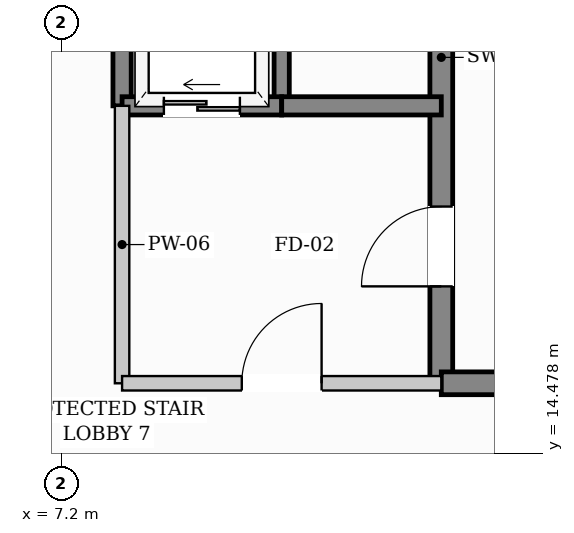
"""IFC4 building model, lengths in metres.
Left out: names, types, materials, properties, quantities, classifications, styles, units other than length and angle.
Written with IfcOpenShell. Run it as: python <this file> out.ifc"""

import sys

from ifc_helpers import new_model, si_unit, direction, frame, frame_2d, origin, place, context, subcontext, project, spatial, rectangle, extrude, element, fill, save


model = new_model("IFC4")
c1 = context("Model", 3, precision=1e-05, world=origin(), true_north=direction((0.0, 1.0)))
c2 = subcontext(c1, "Body", "Model", "MODEL_VIEW")
j1 = project(units=[si_unit("LENGTHUNIT", "METRE"), si_unit("PLANEANGLEUNIT", "RADIAN")], contexts=[c1])
p1 = place(None, origin())
s1 = spatial("IfcSite", under=j1, at=p1, CompositionType="ELEMENT")
p2 = place(p1, origin())
s2 = spatial("IfcBuilding", under=s1, at=p2, CompositionType="ELEMENT")
p3 = place(p2, frame((0.0, 0.0, 5.1)))
s3 = spatial("IfcBuildingStorey", under=s2, at=p3, CompositionType="ELEMENT", Elevation=5.1)
p4 = place(p3, frame((12.2, 15.4, 0.0), z_axis=(0.0, 0.0, 1.0), x_axis=(0.0, 1.0, 0.0)))
e1 = element("IfcWall", 1, at=p4, inside=s3, PredefinedType="SHEAR", context=c2, shape_type="SweptSolid", body=[
    extrude(rectangle(XDim=6.0, YDim=0.3, at=frame_2d((3.0, 0.0))), origin(), (0.0, 0.0, 1.0), 4.22),
])
p5 = place(p4, frame((1.275, 0.0, 0.0)))
e2 = element("IfcOpeningElement", 2, at=p5, cuts=e1, PredefinedType="OPENING", context=c2, shape_type="SweptSolid", body=[
    extrude(rectangle(XDim=1.05, YDim=2.15, at=frame_2d((0.525, 1.075))), frame((0.0, 0.16, 0.0), z_axis=(0.0, -1.0, 0.0), x_axis=(1.0, 0.0, 0.0)), (0.0, 0.0, 1.0), 0.32),
])
p6 = place(p3, frame((12.2, 15.4, 0.0), z_axis=(0.0, 0.0, 1.0), x_axis=(1.0, 0.0, 0.0)))
e3 = element("IfcWall", 3, at=p6, inside=s3, PredefinedType="SHEAR", context=c2, shape_type="SweptSolid", body=[
    extrude(rectangle(XDim=7.0, YDim=0.3, at=frame_2d((3.5, 0.0))), origin(), (0.0, 0.0, 1.0), 4.22),
])
p7 = place(p3, frame((8.0, 19.05, 0.0), z_axis=(0.0, 0.0, 1.0), x_axis=(0.0, 1.0, 0.0)))
e4 = element("IfcWall", 4, at=p7, inside=s3, PredefinedType="SHEAR", context=c2, shape_type="SweptSolid", body=[
    extrude(rectangle(XDim=2.35, YDim=0.24, at=frame_2d((1.175, 0.0))), origin(), (0.0, 0.0, 1.0), 4.22),
])
p8 = place(p3, frame((10.1, 19.05, 0.0), z_axis=(0.0, 0.0, 1.0), x_axis=(0.0, 1.0, 0.0)))
e5 = element("IfcWall", 5, at=p8, inside=s3, PredefinedType="SHEAR", context=c2, shape_type="SweptSolid", body=[
    extrude(rectangle(XDim=2.35, YDim=0.2, at=frame_2d((1.175, 0.0))), origin(), (0.0, 0.0, 1.0), 4.22),
])
p9 = place(p3, frame((8.0, 19.05, 0.0), z_axis=(0.0, 0.0, 1.0), x_axis=(1.0, 0.0, 0.0)))
e6 = element("IfcWall", 6, at=p9, inside=s3, PredefinedType="SHEAR", context=c2, shape_type="SweptSolid", body=[
    extrude(rectangle(XDim=2.1, YDim=0.24, at=frame_2d((1.05, 0.0))), origin(), (0.0, 0.0, 1.0), 4.22),
])
p10 = place(p9, frame((0.55, 0.0, 0.0)))
e7 = element("IfcOpeningElement", 7, at=p10, cuts=e6, PredefinedType="OPENING", context=c2, shape_type="SweptSolid", body=[
    extrude(rectangle(XDim=1.0, YDim=2.1, at=frame_2d((0.5, 1.05))), frame((0.0, 0.13, 0.0), z_axis=(0.0, -1.0, 0.0), x_axis=(1.0, 0.0, 0.0)), (0.0, 0.0, 1.0), 0.26),
])
p11 = place(p3, frame((10.1, 19.05, 0.0), z_axis=(0.0, 0.0, 1.0), x_axis=(1.0, 0.0, 0.0)))
e8 = element("IfcWall", 8, at=p11, inside=s3, PredefinedType="SHEAR", context=c2, shape_type="SweptSolid", body=[
    extrude(rectangle(XDim=2.1, YDim=0.24, at=frame_2d((1.05, 0.0))), origin(), (0.0, 0.0, 1.0), 4.22),
])
p12 = place(p3, frame((8.0, 15.4, 0.0), z_axis=(0.0, 0.0, 1.0), x_axis=(0.0, 1.0, 0.0)))
e9 = element("IfcWall", 9, at=p12, inside=s3, PredefinedType="PARTITIONING", context=c2, shape_type="SweptSolid", body=[
    extrude(rectangle(XDim=3.65, YDim=0.19, at=frame_2d((1.825, 0.0))), origin(), (0.0, 0.0, 1.0), 4.22),
])
p13 = place(p3, frame((8.0, 15.4, 0.0), z_axis=(0.0, 0.0, 1.0), x_axis=(1.0, 0.0, 0.0)))
e10 = element("IfcWall", 10, at=p13, inside=s3, PredefinedType="PARTITIONING", context=c2, shape_type="SweptSolid", body=[
    extrude(rectangle(XDim=4.2, YDim=0.19, at=frame_2d((2.1, 0.0))), origin(), (0.0, 0.0, 1.0), 4.22),
])
p14 = place(p13, frame((1.575, 0.0, 0.0)))
e11 = element("IfcOpeningElement", 11, at=p14, cuts=e10, PredefinedType="OPENING", context=c2, shape_type="SweptSolid", body=[
    extrude(rectangle(XDim=1.05, YDim=2.15, at=frame_2d((0.525, 1.075))), frame((0.0, 0.105, 0.0), z_axis=(0.0, -1.0, 0.0), x_axis=(1.0, 0.0, 0.0)), (0.0, 0.0, 1.0), 0.21),
])
p15 = place(p5, origin())
e12 = element("IfcDoor", 12, at=p15, inside=s3, OperationType="SINGLE_SWING_LEFT", PredefinedType="DOOR", context=c2, shape_type="SweptSolid", body=[
    extrude(rectangle(XDim=1.05, YDim=2.15, at=frame_2d((0.525, 1.075))), frame((0.0, 0.025, 0.0), z_axis=(0.0, -1.0, 0.0), x_axis=(1.0, 0.0, 0.0)), (0.0, 0.0, 1.0), 0.05),
])
fill(e2, e12)
p16 = place(p10, origin())
e13 = element("IfcDoor", 13, at=p16, inside=s3, OperationType="SLIDING_TO_LEFT", PredefinedType="DOOR", context=c2, shape_type="SweptSolid", body=[
    extrude(rectangle(XDim=1.0, YDim=2.1, at=frame_2d((0.5, 1.05))), frame((0.0, 0.025, 0.0), z_axis=(0.0, -1.0, 0.0), x_axis=(1.0, 0.0, 0.0)), (0.0, 0.0, 1.0), 0.05),
])
fill(e7, e13)
p17 = place(p14, origin())
e14 = element("IfcDoor", 14, at=p17, inside=s3, OperationType="SINGLE_SWING_RIGHT", PredefinedType="DOOR", context=c2, shape_type="SweptSolid", body=[
    extrude(rectangle(XDim=1.05, YDim=2.15, at=frame_2d((0.525, 1.075))), frame((0.0, 0.025, 0.0), z_axis=(0.0, -1.0, 0.0), x_axis=(1.0, 0.0, 0.0)), (0.0, 0.0, 1.0), 0.05),
])
fill(e11, e14)
save(model, sys.argv[1])
